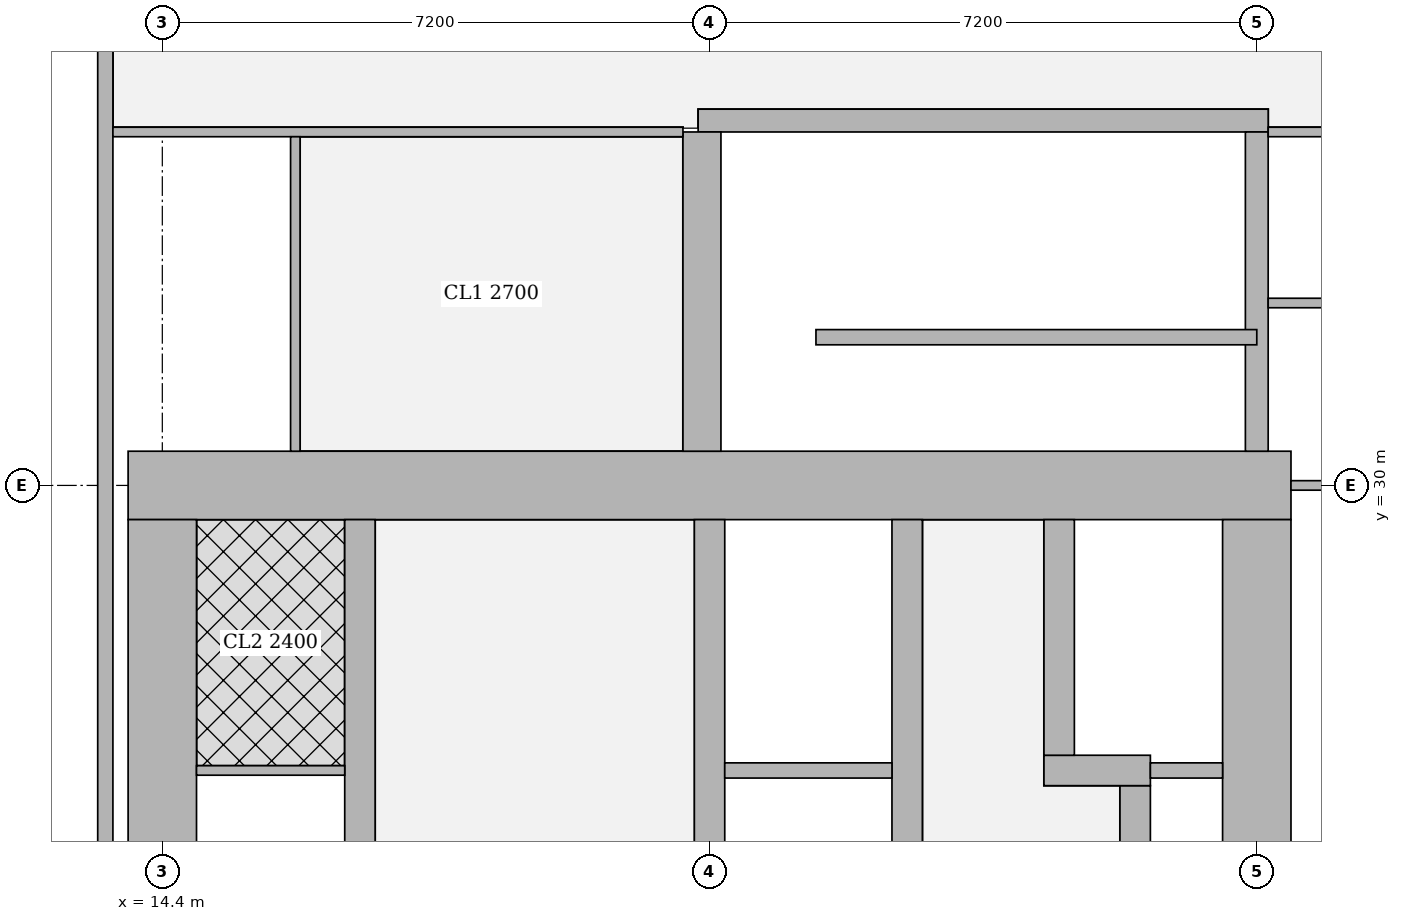
"""IFC4 building model, lengths in metres.
Left out: names, types, materials, properties, quantities, classifications, styles, units other than length and angle.
Written with IfcOpenShell. Run it as: python <this file> out.ifc"""

import sys

from ifc_helpers import new_model, si_unit, direction, frame, frame_2d, origin, place, context, subcontext, project, spatial, rectangle, extrude, element, fill, save


model = new_model("IFC4")
c1 = context("Model", 3, precision=1e-05, world=origin(), true_north=direction((0.0, 1.0)))
c2 = subcontext(c1, "Body", "Model", "MODEL_VIEW")
j1 = project(units=[si_unit("LENGTHUNIT", "METRE"), si_unit("PLANEANGLEUNIT", "RADIAN")], contexts=[c1])
p1 = place(None, origin())
s1 = spatial("IfcSite", under=j1, at=p1, CompositionType="ELEMENT")
p2 = place(p1, origin())
s2 = spatial("IfcBuilding", under=s1, at=p2, CompositionType="ELEMENT")
p3 = place(p2, frame((0.0, 0.0, 223.7)))
s3 = spatial("IfcBuildingStorey", under=s2, at=p3, CompositionType="ELEMENT", Elevation=223.7)
p4 = place(p3, frame((13.95, 30.0, 0.0), z_axis=(0.0, 0.0, 1.0), x_axis=(1.0, 0.0, 0.0)))
e1 = element("IfcWall", 1, at=p4, inside=s3, PredefinedType="SHEAR", context=c2, shape_type="SweptSolid", body=[
    extrude(rectangle(XDim=15.3, YDim=0.9, at=frame_2d((7.65, 0.0))), origin(), (0.0, 0.0, 1.0), 3.75),
])
p5 = place(p4, frame((4.45, 0.0, 0.0)))
e2 = element("IfcOpeningElement", 2, at=p5, cuts=e1, PredefinedType="OPENING", context=c2, shape_type="SweptSolid", body=[
    extrude(rectangle(XDim=1.8, YDim=2.1, at=frame_2d((0.9, 1.05))), frame((0.0, 0.46, 0.0), z_axis=(0.0, -1.0, 0.0), x_axis=(1.0, 0.0, 0.0)), (0.0, 0.0, 1.0), 0.92),
])
p6 = place(p4, frame((10.7, 0.0, 0.0)))
e3 = element("IfcOpeningElement", 3, at=p6, cuts=e1, PredefinedType="OPENING", context=c2, shape_type="SweptSolid", body=[
    extrude(rectangle(XDim=1.1, YDim=2.1, at=frame_2d((0.55, 1.05))), frame((0.0, 0.46, 0.0), z_axis=(0.0, -1.0, 0.0), x_axis=(1.0, 0.0, 0.0)), (0.0, 0.0, 1.0), 0.92),
])
for number, where, z_axis, x_axis in (
    (4, (14.4, 15.45, 0.0), (0.0, 0.0, 1.0), (0.0, 1.0, 0.0)),
    (5, (28.8, 15.45, 0.0), (0.0, 0.0, 1.0), (0.0, 1.0, 0.0)),
):
    element("IfcWall", number, at=place(p3, frame(where, z_axis=z_axis, x_axis=x_axis)), inside=s3, PredefinedType="SHEAR", context=c2, shape_type="SweptSolid", body=[
        extrude(rectangle(XDim=14.1, YDim=0.9, at=frame_2d((7.05, 0.0))), origin(), (0.0, 0.0, 1.0), 3.75),
    ])
p7 = place(p3, frame((17.0, 15.45, 0.0), z_axis=(0.0, 0.0, 1.0), x_axis=(0.0, 1.0, 0.0)))
e6 = element("IfcWall", 6, at=p7, inside=s3, PredefinedType="SHEAR", context=c2, shape_type="SweptSolid", body=[
    extrude(rectangle(XDim=14.1, YDim=0.4, at=frame_2d((7.05, 0.0))), origin(), (0.0, 0.0, 1.0), 3.75),
])
p8 = place(p7, frame((1.05, 0.0, 0.0)))
e7 = element("IfcOpeningElement", 7, at=p8, cuts=e6, PredefinedType="OPENING", context=c2, shape_type="SweptSolid", body=[
    extrude(rectangle(XDim=1.0, YDim=2.1, at=frame_2d((0.5, 1.05))), frame((0.0, 0.21, 0.0), z_axis=(0.0, -1.0, 0.0), x_axis=(1.0, 0.0, 0.0)), (0.0, 0.0, 1.0), 0.42),
])
p9 = place(p7, frame((4.675, 0.0, 0.0)))
e8 = element("IfcOpeningElement", 8, at=p9, cuts=e6, PredefinedType="OPENING", context=c2, shape_type="SweptSolid", body=[
    extrude(rectangle(XDim=1.0, YDim=2.1, at=frame_2d((0.5, 1.05))), frame((0.0, 0.21, 0.0), z_axis=(0.0, -1.0, 0.0), x_axis=(1.0, 0.0, 0.0)), (0.0, 0.0, 1.0), 0.42),
])
p10 = place(p7, frame((8.425, 0.0, 0.0)))
e9 = element("IfcOpeningElement", 9, at=p10, cuts=e6, PredefinedType="OPENING", context=c2, shape_type="SweptSolid", body=[
    extrude(rectangle(XDim=1.0, YDim=2.1, at=frame_2d((0.5, 1.05))), frame((0.0, 0.21, 0.0), z_axis=(0.0, -1.0, 0.0), x_axis=(1.0, 0.0, 0.0)), (0.0, 0.0, 1.0), 0.42),
])
p11 = place(p7, frame((12.175, 0.0, 0.0)))
e10 = element("IfcOpeningElement", 10, at=p11, cuts=e6, PredefinedType="OPENING", context=c2, shape_type="SweptSolid", body=[
    extrude(rectangle(XDim=1.0, YDim=2.1, at=frame_2d((0.5, 1.05))), frame((0.0, 0.21, 0.0), z_axis=(0.0, -1.0, 0.0), x_axis=(1.0, 0.0, 0.0)), (0.0, 0.0, 1.0), 0.42),
])
p12 = place(p3, frame((21.6, 15.45, 0.0), z_axis=(0.0, 0.0, 1.0), x_axis=(0.0, 1.0, 0.0)))
e11 = element("IfcWall", 11, at=p12, inside=s3, PredefinedType="SHEAR", context=c2, shape_type="SweptSolid", body=[
    extrude(rectangle(XDim=14.1, YDim=0.4, at=frame_2d((7.05, 0.0))), origin(), (0.0, 0.0, 1.0), 3.75),
])
p13 = place(p12, frame((0.875, 0.0, 0.0)))
e12 = element("IfcOpeningElement", 12, at=p13, cuts=e11, PredefinedType="OPENING", context=c2, shape_type="SweptSolid", body=[
    extrude(rectangle(XDim=1.1, YDim=2.1, at=frame_2d((0.55, 1.05))), frame((0.0, 0.21, 0.0), z_axis=(0.0, -1.0, 0.0), x_axis=(1.0, 0.0, 0.0)), (0.0, 0.0, 1.0), 0.42),
])
p14 = place(p12, frame((4.625, 0.0, 0.0)))
e13 = element("IfcOpeningElement", 13, at=p14, cuts=e11, PredefinedType="OPENING", context=c2, shape_type="SweptSolid", body=[
    extrude(rectangle(XDim=1.1, YDim=2.1, at=frame_2d((0.55, 1.05))), frame((0.0, 0.21, 0.0), z_axis=(0.0, -1.0, 0.0), x_axis=(1.0, 0.0, 0.0)), (0.0, 0.0, 1.0), 0.42),
])
p15 = place(p12, frame((8.375, 0.0, 0.0)))
e14 = element("IfcOpeningElement", 14, at=p15, cuts=e11, PredefinedType="OPENING", context=c2, shape_type="SweptSolid", body=[
    extrude(rectangle(XDim=1.1, YDim=2.1, at=frame_2d((0.55, 1.05))), frame((0.0, 0.21, 0.0), z_axis=(0.0, -1.0, 0.0), x_axis=(1.0, 0.0, 0.0)), (0.0, 0.0, 1.0), 0.42),
])
p16 = place(p12, frame((12.125, 0.0, 0.0)))
e15 = element("IfcOpeningElement", 15, at=p16, cuts=e11, PredefinedType="OPENING", context=c2, shape_type="SweptSolid", body=[
    extrude(rectangle(XDim=1.1, YDim=2.1, at=frame_2d((0.55, 1.05))), frame((0.0, 0.21, 0.0), z_axis=(0.0, -1.0, 0.0), x_axis=(1.0, 0.0, 0.0)), (0.0, 0.0, 1.0), 0.42),
])
p17 = place(p3, frame((24.2, 15.45, 0.0), z_axis=(0.0, 0.0, 1.0), x_axis=(0.0, 1.0, 0.0)))
e16 = element("IfcWall", 16, at=p17, inside=s3, PredefinedType="SHEAR", context=c2, shape_type="SweptSolid", body=[
    extrude(rectangle(XDim=14.1, YDim=0.4, at=frame_2d((7.05, 0.0))), origin(), (0.0, 0.0, 1.0), 3.75),
])
p18 = place(p3, frame((27.2, 18.95, 0.0), z_axis=(0.0, 0.0, 1.0), x_axis=(0.0, 1.0, 0.0)))
e17 = element("IfcWall", 17, at=p18, inside=s3, PredefinedType="SHEAR", context=c2, shape_type="SweptSolid", body=[
    extrude(rectangle(XDim=7.1, YDim=0.4, at=frame_2d((3.55, 0.0))), origin(), (0.0, 0.0, 1.0), 3.75),
])
p19 = place(p3, frame((26.0, 26.25, 0.0), z_axis=(0.0, 0.0, 1.0), x_axis=(1.0, 0.0, 0.0)))
e18 = element("IfcWall", 18, at=p19, inside=s3, PredefinedType="SHEAR", context=c2, shape_type="SweptSolid", body=[
    extrude(rectangle(XDim=1.4, YDim=0.4, at=frame_2d((0.7, 0.0))), origin(), (0.0, 0.0, 1.0), 3.75),
])
p20 = place(p3, frame((26.2, 26.45, 0.0), z_axis=(0.0, 0.0, 1.0), x_axis=(0.0, 1.0, 0.0)))
e19 = element("IfcWall", 19, at=p20, inside=s3, PredefinedType="SHEAR", context=c2, shape_type="SweptSolid", body=[
    extrude(rectangle(XDim=3.1, YDim=0.4, at=frame_2d((1.55, 0.0))), origin(), (0.0, 0.0, 1.0), 3.75),
])
p21 = place(p20, frame((1.075, 0.0, 0.0)))
e20 = element("IfcOpeningElement", 20, at=p21, cuts=e19, PredefinedType="OPENING", context=c2, shape_type="SweptSolid", body=[
    extrude(rectangle(XDim=1.2, YDim=2.1, at=frame_2d((0.6, 1.05))), frame((0.0, 0.21, 0.0), z_axis=(0.0, -1.0, 0.0), x_axis=(1.0, 0.0, 0.0)), (0.0, 0.0, 1.0), 0.42),
])
p22 = place(p3, frame((21.45, 34.8, 0.0), z_axis=(0.0, 0.0, 1.0), x_axis=(1.0, 0.0, 0.0)))
e21 = element("IfcWall", 21, at=p22, inside=s3, PredefinedType="SHEAR", context=c2, shape_type="SweptSolid", body=[
    extrude(rectangle(XDim=7.5, YDim=0.3, at=frame_2d((3.75, 0.0))), origin(), (0.0, 0.0, 1.0), 3.75),
])
p23 = place(p22, frame((0.5, 0.0, 0.0)))
e22 = element("IfcOpeningElement", 22, at=p23, cuts=e21, PredefinedType="OPENING", context=c2, shape_type="SweptSolid", body=[
    extrude(rectangle(XDim=1.1, YDim=2.1, at=frame_2d((0.55, 1.05))), frame((0.0, 0.16, 0.0), z_axis=(0.0, -1.0, 0.0), x_axis=(1.0, 0.0, 0.0)), (0.0, 0.0, 1.0), 0.32),
])
p24 = place(p3, frame((21.5, 30.45, 0.0), z_axis=(0.0, 0.0, 1.0), x_axis=(0.0, 1.0, 0.0)))
e23 = element("IfcWall", 23, at=p24, inside=s3, PredefinedType="SHEAR", context=c2, shape_type="SweptSolid", body=[
    extrude(rectangle(XDim=4.2, YDim=0.5, at=frame_2d((2.1, 0.0))), origin(), (0.0, 0.0, 1.0), 3.75),
])
p25 = place(p3, frame((28.8, 30.45, 0.0), z_axis=(0.0, 0.0, 1.0), x_axis=(0.0, 1.0, 0.0)))
e24 = element("IfcWall", 24, at=p25, inside=s3, PredefinedType="SHEAR", context=c2, shape_type="SweptSolid", body=[
    extrude(rectangle(XDim=4.2, YDim=0.3, at=frame_2d((2.1, 0.0))), origin(), (0.0, 0.0, 1.0), 3.75),
])
p26 = place(p3, frame((13.65, 44.837, 0.0), z_axis=(0.0, 0.0, 1.0), x_axis=(0.0, -1.0, 0.0)))
e25 = element("IfcWall", 25, at=p26, inside=s3, PredefinedType="SOLIDWALL", context=c2, shape_type="SweptSolid", body=[
    extrude(rectangle(XDim=44.674, YDim=0.2, at=frame_2d((22.337, 0.0))), origin(), (0.0, 0.0, 1.0), 3.5),
])
p27 = place(p26, frame((2.614, 0.0, 0.9)))
e26 = element("IfcOpeningElement", 26, at=p27, cuts=e25, PredefinedType="OPENING", context=c2, shape_type="SweptSolid", body=[
    extrude(rectangle(XDim=2.4, YDim=1.5, at=frame_2d((1.2, 0.75))), frame((0.0, 0.11, 0.0), z_axis=(0.0, -1.0, 0.0), x_axis=(1.0, 0.0, 0.0)), (0.0, 0.0, 1.0), 0.22),
])
p28 = place(p26, frame((39.333, 0.0, 0.9)))
e27 = element("IfcOpeningElement", 27, at=p28, cuts=e25, PredefinedType="OPENING", context=c2, shape_type="SweptSolid", body=[
    extrude(rectangle(XDim=2.4, YDim=1.5, at=frame_2d((1.2, 0.75))), frame((0.0, 0.11, 0.0), z_axis=(0.0, -1.0, 0.0), x_axis=(1.0, 0.0, 0.0)), (0.0, 0.0, 1.0), 0.22),
])
p29 = place(p26, frame((33.087, 0.0, 0.0)))
e28 = element("IfcOpeningElement", 28, at=p29, cuts=e25, PredefinedType="OPENING", context=c2, shape_type="SweptSolid", body=[
    extrude(rectangle(XDim=1.0, YDim=2.4, at=frame_2d((0.5, 1.2))), frame((0.0, 0.11, 0.0), z_axis=(0.0, -1.0, 0.0), x_axis=(1.0, 0.0, 0.0)), (0.0, 0.0, 1.0), 0.22),
])
p30 = place(p26, frame((10.587, 0.0, 0.0)))
e29 = element("IfcOpeningElement", 29, at=p30, cuts=e25, PredefinedType="OPENING", context=c2, shape_type="SweptSolid", body=[
    extrude(rectangle(XDim=1.0, YDim=2.4, at=frame_2d((0.5, 1.2))), frame((0.0, 0.11, 0.0), z_axis=(0.0, -1.0, 0.0), x_axis=(1.0, 0.0, 0.0)), (0.0, 0.0, 1.0), 0.22),
])
p31 = place(p3, frame((13.75, 34.65, 0.0), z_axis=(0.0, 0.0, 1.0), x_axis=(1.0, 0.0, 0.0)))
e30 = element("IfcWall", 30, at=p31, inside=s3, PredefinedType="PARTITIONING", context=c2, shape_type="SweptSolid", body=[
    extrude(rectangle(XDim=7.5, YDim=0.125, at=frame_2d((3.75, 0.0))), origin(), (0.0, 0.0, 1.0), 3.5),
])
p32 = place(p31, frame((4.15, 0.0, 0.0)))
e31 = element("IfcOpeningElement", 31, at=p32, cuts=e30, PredefinedType="OPENING", context=c2, shape_type="SweptSolid", body=[
    extrude(rectangle(XDim=1.8, YDim=2.1, at=frame_2d((0.9, 1.05))), frame((0.0, 0.073, 0.0), z_axis=(0.0, -1.0, 0.0), x_axis=(1.0, 0.0, 0.0)), (0.0, 0.0, 1.0), 0.145),
])
p33 = place(p3, frame((16.15, 30.45, 0.0), z_axis=(0.0, 0.0, 1.0), x_axis=(0.0, 1.0, 0.0)))
e32 = element("IfcWall", 32, at=p33, inside=s3, PredefinedType="PARTITIONING", context=c2, shape_type="SweptSolid", body=[
    extrude(rectangle(XDim=4.137, YDim=0.125, at=frame_2d((2.068, 0.0))), origin(), (0.0, 0.0, 1.0), 3.5),
])
p34 = place(p33, frame((1.625, 0.0, 0.0)))
e33 = element("IfcOpeningElement", 33, at=p34, cuts=e32, PredefinedType="OPENING", context=c2, shape_type="SweptSolid", body=[
    extrude(rectangle(XDim=1.0, YDim=2.1, at=frame_2d((0.5, 1.05))), frame((0.0, 0.073, 0.0), z_axis=(0.0, -1.0, 0.0), x_axis=(1.0, 0.0, 0.0)), (0.0, 0.0, 1.0), 0.145),
])
p35 = place(p3, frame((28.95, 34.65, 0.0), z_axis=(0.0, 0.0, 1.0), x_axis=(1.0, 0.0, 0.0)))
e34 = element("IfcWall", 34, at=p35, inside=s3, PredefinedType="PARTITIONING", context=c2, shape_type="SweptSolid", body=[
    extrude(rectangle(XDim=4.381, YDim=0.125, at=frame_2d((2.19, 0.0))), origin(), (0.0, 0.0, 1.0), 3.5),
])
p36 = place(p3, frame((29.25, 30.0, 0.0), z_axis=(0.0, 0.0, 1.0), x_axis=(1.0, 0.0, 0.0)))
e35 = element("IfcWall", 35, at=p36, inside=s3, PredefinedType="PARTITIONING", context=c2, shape_type="SweptSolid", body=[
    extrude(rectangle(XDim=3.049, YDim=0.125, at=frame_2d((1.524, 0.0))), origin(), (0.0, 0.0, 1.0), 3.5),
])
p37 = place(p3, frame((28.95, 32.4, 0.0), z_axis=(0.0, 0.0, 1.0), x_axis=(1.0, 0.0, 0.0)))
e36 = element("IfcWall", 36, at=p37, inside=s3, PredefinedType="PARTITIONING", context=c2, shape_type="SweptSolid", body=[
    extrude(rectangle(XDim=4.722, YDim=0.125, at=frame_2d((2.361, 0.0))), origin(), (0.0, 0.0, 1.0), 3.5),
])
p38 = place(p3, frame((14.85, 26.25, 0.0), z_axis=(0.0, 0.0, 1.0), x_axis=(1.0, 0.0, 0.0)))
e37 = element("IfcWall", 37, at=p38, inside=s3, PredefinedType="PARTITIONING", context=c2, shape_type="SweptSolid", body=[
    extrude(rectangle(XDim=1.95, YDim=0.125, at=frame_2d((0.975, 0.0))), origin(), (0.0, 0.0, 1.0), 3.5),
])
p39 = place(p3, frame((23.0, 31.95, 0.0), z_axis=(0.0, 0.0, 1.0), x_axis=(1.0, 0.0, 0.0)))
e38 = element("IfcWall", 38, at=p39, inside=s3, PredefinedType="SHEAR", context=c2, shape_type="SweptSolid", body=[
    extrude(rectangle(XDim=5.8, YDim=0.2, at=frame_2d((2.9, 0.0))), origin(), (0.0, 0.0, 1.0), 3.75),
])
p40 = place(p3, frame((21.8, 26.25, 0.0), z_axis=(0.0, 0.0, 1.0), x_axis=(1.0, 0.0, 0.0)))
e39 = element("IfcWall", 39, at=p40, inside=s3, PredefinedType="SOLIDWALL", context=c2, shape_type="SweptSolid", body=[
    extrude(rectangle(XDim=2.2, YDim=0.2, at=frame_2d((1.1, 0.0))), origin(), (0.0, 0.0, 1.0), 3.5),
])
p41 = place(p3, frame((27.4, 26.25, 0.0), z_axis=(0.0, 0.0, 1.0), x_axis=(1.0, 0.0, 0.0)))
e40 = element("IfcWall", 40, at=p41, inside=s3, PredefinedType="SOLIDWALL", context=c2, shape_type="SweptSolid", body=[
    extrude(rectangle(XDim=0.95, YDim=0.2, at=frame_2d((0.475, 0.0))), origin(), (0.0, 0.0, 1.0), 3.5),
])
p42 = place(p30, origin())
e41 = element("IfcDoor", 41, at=p42, inside=s3, OperationType="SINGLE_SWING_RIGHT", PredefinedType="DOOR", context=c2, shape_type="SweptSolid", body=[
    extrude(rectangle(XDim=1.0, YDim=2.4, at=frame_2d((0.5, 1.2))), frame((0.0, 0.025, 0.0), z_axis=(0.0, -1.0, 0.0), x_axis=(1.0, 0.0, 0.0)), (0.0, 0.0, 1.0), 0.05),
])
fill(e29, e41)
p43 = place(p34, origin())
e42 = element("IfcDoor", 42, at=p43, inside=s3, OperationType="SINGLE_SWING_RIGHT", PredefinedType="DOOR", context=c2, shape_type="SweptSolid", body=[
    extrude(rectangle(XDim=1.0, YDim=2.1, at=frame_2d((0.5, 1.05))), frame((0.0, 0.025, 0.0), z_axis=(0.0, -1.0, 0.0), x_axis=(1.0, 0.0, 0.0)), (0.0, 0.0, 1.0), 0.05),
])
fill(e33, e42)
p44 = place(p32, origin())
e43 = element("IfcDoor", 43, at=p44, inside=s3, OperationType="DOUBLE_DOOR_SINGLE_SWING", PredefinedType="DOOR", context=c2, shape_type="SweptSolid", body=[
    extrude(rectangle(XDim=1.8, YDim=2.1, at=frame_2d((0.9, 1.05))), frame((0.0, 0.025, 0.0), z_axis=(0.0, -1.0, 0.0), x_axis=(1.0, 0.0, 0.0)), (0.0, 0.0, 1.0), 0.05),
])
fill(e31, e43)
p45 = place(p11, origin())
e44 = element("IfcDoor", 44, at=p45, inside=s3, OperationType="SINGLE_SWING_RIGHT", PredefinedType="DOOR", context=c2, shape_type="SweptSolid", body=[
    extrude(rectangle(XDim=1.0, YDim=2.1, at=frame_2d((0.5, 1.05))), frame((0.0, 0.025, 0.0), z_axis=(0.0, -1.0, 0.0), x_axis=(1.0, 0.0, 0.0)), (0.0, 0.0, 1.0), 0.05),
])
fill(e10, e44)
p46 = place(p5, origin())
e45 = element("IfcDoor", 45, at=p46, inside=s3, OperationType="DOUBLE_DOOR_SINGLE_SWING", PredefinedType="DOOR", context=c2, shape_type="SweptSolid", body=[
    extrude(rectangle(XDim=1.8, YDim=2.1, at=frame_2d((0.9, 1.05))), frame((0.0, 0.025, 0.0), z_axis=(0.0, -1.0, 0.0), x_axis=(1.0, 0.0, 0.0)), (0.0, 0.0, 1.0), 0.05),
])
fill(e2, e45)
p47 = place(p6, origin())
e46 = element("IfcDoor", 46, at=p47, inside=s3, OperationType="SINGLE_SWING_LEFT", PredefinedType="DOOR", context=c2, shape_type="SweptSolid", body=[
    extrude(rectangle(XDim=1.1, YDim=2.1, at=frame_2d((0.55, 1.05))), frame((0.0, 0.025, 0.0), z_axis=(0.0, -1.0, 0.0), x_axis=(1.0, 0.0, 0.0)), (0.0, 0.0, 1.0), 0.05),
])
fill(e3, e46)
p48 = place(p21, origin())
e47 = element("IfcDoor", 47, at=p48, inside=s3, OperationType="DOUBLE_DOOR_SLIDING", PredefinedType="DOOR", context=c2, shape_type="SweptSolid", body=[
    extrude(rectangle(XDim=1.2, YDim=2.1, at=frame_2d((0.6, 1.05))), frame((0.0, 0.025, 0.0), z_axis=(0.0, -1.0, 0.0), x_axis=(1.0, 0.0, 0.0)), (0.0, 0.0, 1.0), 0.05),
])
fill(e20, e47)
p49 = place(p16, origin())
e48 = element("IfcDoor", 48, at=p49, inside=s3, OperationType="DOUBLE_DOOR_SLIDING", PredefinedType="DOOR", context=c2, shape_type="SweptSolid", body=[
    extrude(rectangle(XDim=1.1, YDim=2.1, at=frame_2d((0.55, 1.05))), frame((0.0, 0.025, 0.0), z_axis=(0.0, -1.0, 0.0), x_axis=(1.0, 0.0, 0.0)), (0.0, 0.0, 1.0), 0.05),
])
fill(e15, e48)
p50 = place(p23, origin())
e49 = element("IfcDoor", 49, at=p50, inside=s3, OperationType="SINGLE_SWING_RIGHT", PredefinedType="DOOR", context=c2, shape_type="SweptSolid", body=[
    extrude(rectangle(XDim=1.1, YDim=2.1, at=frame_2d((0.55, 1.05))), frame((0.0, 0.025, 0.0), z_axis=(0.0, -1.0, 0.0), x_axis=(1.0, 0.0, 0.0)), (0.0, 0.0, 1.0), 0.05),
])
fill(e22, e49)
save(model, sys.argv[1])
